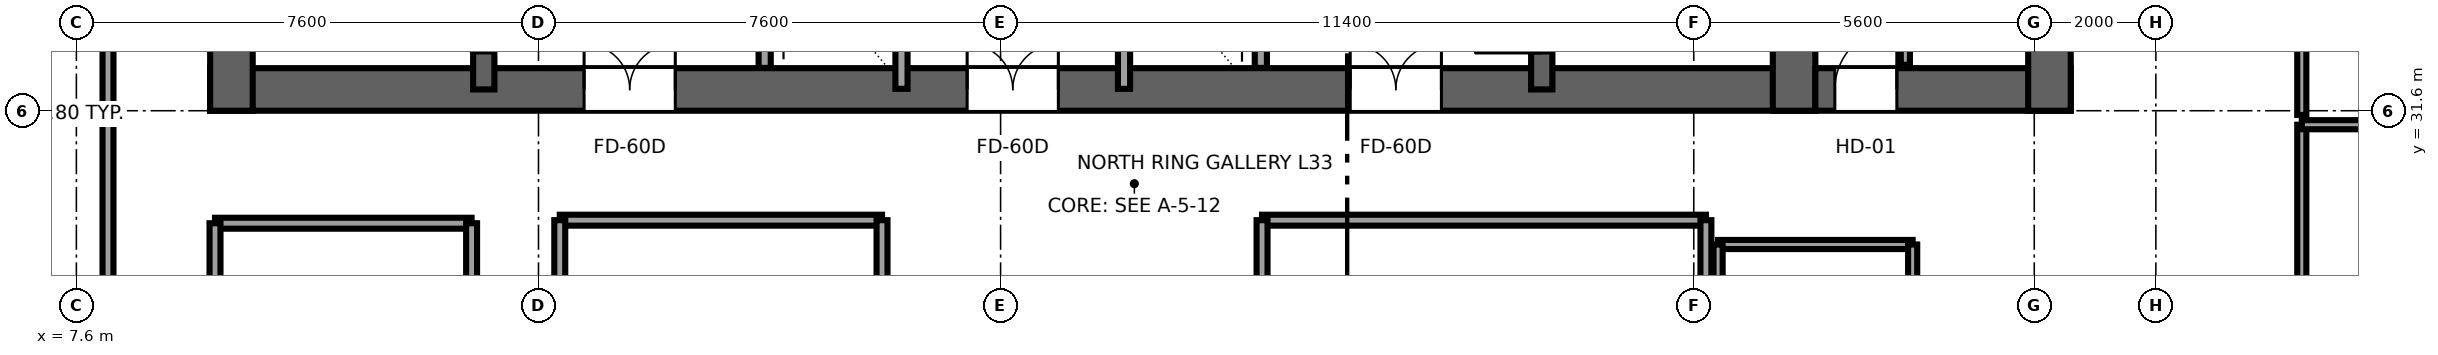
"""IFC4 building model, lengths in metres.
Left out: names, types, materials, properties, quantities, classifications, styles, units other than length and angle.
Written with IfcOpenShell. Run it as: python <this file> out.ifc"""

import sys

from ifc_helpers import new_model, si_unit, direction, frame, frame_2d, origin, place, context, subcontext, project, spatial, rectangle, extrude, source, transform, mapped, element, fill, save


model = new_model("IFC4")
c1 = context("Model", 3, precision=1e-05, world=origin(), true_north=direction((0.0, 1.0)))
c2 = subcontext(c1, "Body", "Model", "MODEL_VIEW")
j1 = project(units=[si_unit("LENGTHUNIT", "METRE"), si_unit("PLANEANGLEUNIT", "RADIAN")], contexts=[c1])
p1 = place(None, origin())
s1 = spatial("IfcSite", under=j1, at=p1, CompositionType="ELEMENT")
p2 = place(p1, origin())
s2 = spatial("IfcBuilding", under=s1, at=p2, CompositionType="ELEMENT")
p3 = place(p2, frame((0.0, 0.0, 129.3)))
s3 = spatial("IfcBuildingStorey", under=s2, at=p3, CompositionType="ELEMENT", Elevation=129.3)
p4 = place(p3, frame((9.8, 31.95, 0.0), z_axis=(0.0, 0.0, 1.0), x_axis=(1.0, 0.0, 0.0)))
e1 = element("IfcWall", 1, at=p4, inside=s3, PredefinedType="SHEAR", context=c2, shape_type="SweptSolid", body=[
    extrude(rectangle(XDim=26.4, YDim=0.7, at=frame_2d((13.2, 0.0))), origin(), (0.0, 0.0, 1.0), 3.55),
])
p5 = place(p4, frame((7.65, 0.0, 0.0), z_axis=(0.0, 0.0, 1.0), x_axis=(-1.0, 0.0, 0.0)))
e2 = element("IfcOpeningElement", 2, at=p5, cuts=e1, PredefinedType="OPENING", context=c2, shape_type="SweptSolid", body=[
    extrude(rectangle(XDim=1.5, YDim=2.04, at=frame_2d((0.75, 1.02))), frame((0.0, 0.36, 0.0), z_axis=(0.0, -1.0, 0.0), x_axis=(1.0, 0.0, 0.0)), (0.0, 0.0, 1.0), 0.72),
])
p6 = place(p4, frame((13.95, 0.0, 0.0), z_axis=(0.0, 0.0, 1.0), x_axis=(-1.0, 0.0, 0.0)))
e3 = element("IfcOpeningElement", 3, at=p6, cuts=e1, PredefinedType="OPENING", context=c2, shape_type="SweptSolid", body=[
    extrude(rectangle(XDim=1.5, YDim=2.04, at=frame_2d((0.75, 1.02))), frame((0.0, 0.36, 0.0), z_axis=(0.0, -1.0, 0.0), x_axis=(1.0, 0.0, 0.0)), (0.0, 0.0, 1.0), 0.72),
])
p7 = place(p4, frame((20.25, 0.0, 0.0), z_axis=(0.0, 0.0, 1.0), x_axis=(-1.0, 0.0, 0.0)))
e4 = element("IfcOpeningElement", 4, at=p7, cuts=e1, PredefinedType="OPENING", context=c2, shape_type="SweptSolid", body=[
    extrude(rectangle(XDim=1.5, YDim=2.04, at=frame_2d((0.75, 1.02))), frame((0.0, 0.36, 0.0), z_axis=(0.0, -1.0, 0.0), x_axis=(1.0, 0.0, 0.0)), (0.0, 0.0, 1.0), 0.72),
])
for number, where, z_axis, x_axis in (
    (5, (10.15, 31.6, 0.0), (0.0, 0.0, 1.0), (0.0, 1.0, 0.0)),
    (6, (35.85, 31.6, 0.0), (0.0, 0.0, 1.0), (0.0, 1.0, 0.0)),
):
    element("IfcWall", number, at=place(p3, frame(where, z_axis=z_axis, x_axis=x_axis)), inside=s3, PredefinedType="SHEAR", context=c2, shape_type="SweptSolid", body=[
        extrude(rectangle(XDim=13.6, YDim=0.7, at=frame_2d((6.8, 0.0))), origin(), (0.0, 0.0, 1.0), 3.55),
    ])
p8 = place(p3, frame((14.3, 31.95, 0.0), z_axis=(0.0, 0.0, 1.0), x_axis=(0.0, 1.0, 0.0)))
e7 = element("IfcWall", 7, at=p8, inside=s3, PredefinedType="SHEAR", context=c2, shape_type="SweptSolid", body=[
    extrude(rectangle(XDim=12.9, YDim=0.35, at=frame_2d((6.45, 0.0))), origin(), (0.0, 0.0, 1.0), 3.55),
])
p9 = place(p8, frame((0.6, 0.0, 0.0)))
e8 = element("IfcOpeningElement", 8, at=p9, cuts=e7, PredefinedType="OPENING", context=c2, shape_type="SweptSolid", body=[
    extrude(rectangle(XDim=1.1, YDim=2.12, at=frame_2d((0.55, 1.06))), frame((0.0, 0.185, 0.0), z_axis=(0.0, -1.0, 0.0), x_axis=(1.0, 0.0, 0.0)), (0.0, 0.0, 1.0), 0.37),
])
p10 = place(p3, frame((31.7, 31.95, 0.0), z_axis=(0.0, 0.0, 1.0), x_axis=(0.0, 1.0, 0.0)))
e9 = element("IfcWall", 9, at=p10, inside=s3, PredefinedType="SHEAR", context=c2, shape_type="SweptSolid", body=[
    extrude(rectangle(XDim=12.9, YDim=0.35, at=frame_2d((6.45, 0.0))), origin(), (0.0, 0.0, 1.0), 3.55),
])
p11 = place(p10, frame((1.7, 0.0, 0.0), z_axis=(0.0, 0.0, 1.0), x_axis=(-1.0, 0.0, 0.0)))
e10 = element("IfcOpeningElement", 10, at=p11, cuts=e9, PredefinedType="OPENING", context=c2, shape_type="SweptSolid", body=[
    extrude(rectangle(XDim=1.1, YDim=2.12, at=frame_2d((0.55, 1.06))), frame((0.0, 0.185, 0.0), z_axis=(0.0, -1.0, 0.0), x_axis=(1.0, 0.0, 0.0)), (0.0, 0.0, 1.0), 0.37),
])
p12 = place(p3, frame((36.2, 31.95, 0.0), z_axis=(0.0, 0.0, 1.0), x_axis=(1.0, 0.0, 0.0)))
e11 = element("IfcWall", 11, at=p12, inside=s3, PredefinedType="SHEAR", context=c2, shape_type="SweptSolid", body=[
    extrude(rectangle(XDim=4.2, YDim=0.7, at=frame_2d((2.1, 0.0))), origin(), (0.0, 0.0, 1.0), 3.55),
])
p13 = place(p12, frame((1.34, 0.0, 0.0), z_axis=(0.0, 0.0, 1.0), x_axis=(-1.0, 0.0, 0.0)))
e12 = element("IfcOpeningElement", 12, at=p13, cuts=e11, PredefinedType="OPENING", context=c2, shape_type="SweptSolid", body=[
    extrude(rectangle(XDim=1.02, YDim=2.03, at=frame_2d((0.51, 1.015))), frame((0.0, 0.36, 0.0), z_axis=(0.0, -1.0, 0.0), x_axis=(1.0, 0.0, 0.0)), (0.0, 0.0, 1.0), 0.72),
])
p14 = place(p3, frame((40.05, 31.6, 0.0), z_axis=(0.0, 0.0, 1.0), x_axis=(0.0, 1.0, 0.0)))
e13 = element("IfcWall", 13, at=p14, inside=s3, PredefinedType="SHEAR", context=c2, shape_type="SweptSolid", body=[
    extrude(rectangle(XDim=13.6, YDim=0.7, at=frame_2d((6.8, 0.0))), origin(), (0.0, 0.0, 1.0), 3.55),
])
for number, where, z_axis, x_axis in (
    (14, (18.92, 32.304, 0.0), (0.0, 0.0, 1.0), (0.0, 1.0, 0.0)),
    (15, (27.08, 32.304, 0.0), (0.0, 0.0, 1.0), (0.0, 1.0, 0.0)),
):
    element("IfcWall", number, at=place(p3, frame(where, z_axis=z_axis, x_axis=x_axis)), inside=s3, PredefinedType="SOLIDWALL", context=c2, shape_type="SweptSolid", body=[
        extrude(rectangle(XDim=3.846, YDim=0.2, at=frame_2d((1.923, 0.0))), origin(), (0.0, 0.0, 1.0), 3.37),
    ])
p15 = place(p3, frame((21.17, 31.96, 0.0), z_axis=(0.0, 0.0, 1.0), x_axis=(0.0, 1.0, 0.0)))
e16 = element("IfcWall", 16, at=p15, inside=s3, PredefinedType="SOLIDWALL", context=c2, shape_type="SweptSolid", body=[
    extrude(rectangle(XDim=12.58, YDim=0.2, at=frame_2d((6.29, 0.0))), origin(), (0.0, 0.0, 1.0), 3.37),
])
p16 = place(p15, frame((5.74, 0.0, 0.0)))
e17 = element("IfcOpeningElement", 17, at=p16, cuts=e16, PredefinedType="OPENING", context=c2, shape_type="SweptSolid", body=[
    extrude(rectangle(XDim=1.1, YDim=2.12, at=frame_2d((0.55, 1.06))), frame((0.0, 0.11, 0.0), z_axis=(0.0, -1.0, 0.0), x_axis=(1.0, 0.0, 0.0)), (0.0, 0.0, 1.0), 0.22),
])
p17 = place(p15, frame((8.24, 0.0, 0.0)))
e18 = element("IfcOpeningElement", 18, at=p17, cuts=e16, PredefinedType="OPENING", context=c2, shape_type="SweptSolid", body=[
    extrude(rectangle(XDim=1.1, YDim=2.12, at=frame_2d((0.55, 1.06))), frame((0.0, 0.11, 0.0), z_axis=(0.0, -1.0, 0.0), x_axis=(1.0, 0.0, 0.0)), (0.0, 0.0, 1.0), 0.22),
])
p18 = place(p3, frame((24.83, 31.96, 0.0), z_axis=(0.0, 0.0, 1.0), x_axis=(0.0, 1.0, 0.0)))
e19 = element("IfcWall", 19, at=p18, inside=s3, PredefinedType="SOLIDWALL", context=c2, shape_type="SweptSolid", body=[
    extrude(rectangle(XDim=12.58, YDim=0.2, at=frame_2d((6.29, 0.0))), origin(), (0.0, 0.0, 1.0), 3.37),
])
p19 = place(p18, frame((5.74, 0.0, 0.0)))
e20 = element("IfcOpeningElement", 20, at=p19, cuts=e19, PredefinedType="OPENING", context=c2, shape_type="SweptSolid", body=[
    extrude(rectangle(XDim=1.1, YDim=2.12, at=frame_2d((0.55, 1.06))), frame((0.0, 0.11, 0.0), z_axis=(0.0, -1.0, 0.0), x_axis=(1.0, 0.0, 0.0)), (0.0, 0.0, 1.0), 0.22),
])
p20 = place(p18, frame((8.24, 0.0, 0.0)))
e21 = element("IfcOpeningElement", 21, at=p20, cuts=e19, PredefinedType="OPENING", context=c2, shape_type="SweptSolid", body=[
    extrude(rectangle(XDim=1.1, YDim=2.12, at=frame_2d((0.55, 1.06))), frame((0.0, 0.11, 0.0), z_axis=(0.0, -1.0, 0.0), x_axis=(1.0, 0.0, 0.0)), (0.0, 0.0, 1.0), 0.22),
])
p21 = place(p3, frame((37.68, 32.355, 0.0), z_axis=(0.0, 0.0, 1.0), x_axis=(0.0, 1.0, 0.0)))
e22 = element("IfcWall", 22, at=p21, inside=s3, PredefinedType="PARTITIONING", context=c2, shape_type="SweptSolid", body=[
    extrude(rectangle(XDim=5.845, YDim=0.15, at=frame_2d((2.922, 0.0))), origin(), (0.0, 0.0, 1.0), 3.37),
])
p22 = place(p21, frame((2.413, 0.0, 0.0)))
e23 = element("IfcOpeningElement", 23, at=p22, cuts=e22, PredefinedType="OPENING", context=c2, shape_type="SweptSolid", body=[
    extrude(rectangle(XDim=1.02, YDim=2.03, at=frame_2d((0.51, 1.015))), frame((0.0, 0.085, 0.0), z_axis=(0.0, -1.0, 0.0), x_axis=(1.0, 0.0, 0.0)), (0.0, 0.0, 1.0), 0.17),
])
p23 = place(p3, frame((8.12, 22.3, 0.0), z_axis=(0.0, 0.0, 1.0), x_axis=(0.0, 1.0, 0.0)))
e24 = element("IfcWall", 24, at=p23, inside=s3, PredefinedType="PARTITIONING", context=c2, shape_type="SweptSolid", body=[
    extrude(rectangle(XDim=13.5, YDim=0.18, at=frame_2d((6.75, 0.0))), origin(), (0.0, 0.0, 1.0), 3.37),
])
p24 = place(p23, frame((3.35, 0.0, 0.0)))
e25 = element("IfcOpeningElement", 25, at=p24, cuts=e24, PredefinedType="OPENING", context=c2, shape_type="SweptSolid", body=[
    extrude(rectangle(XDim=1.65, YDim=2.15, at=frame_2d((0.825, 1.075))), frame((0.0, 0.1, 0.0), z_axis=(0.0, -1.0, 0.0), x_axis=(1.0, 0.0, 0.0)), (0.0, 0.0, 1.0), 0.2),
])
p25 = place(p3, frame((44.2, 22.38, 0.0), z_axis=(0.0, 0.0, 1.0), x_axis=(0.0, 1.0, 0.0)))
e26 = element("IfcWall", 26, at=p25, inside=s3, PredefinedType="PARTITIONING", context=c2, shape_type="SweptSolid", body=[
    extrude(rectangle(XDim=8.99, YDim=0.15, at=frame_2d((4.495, 0.0))), origin(), (0.0, 0.0, 1.0), 3.37),
])
p26 = place(p25, frame((4.005, 0.0, 0.0)))
e27 = element("IfcOpeningElement", 27, at=p26, cuts=e26, PredefinedType="OPENING", context=c2, shape_type="SweptSolid", body=[
    extrude(rectangle(XDim=0.98, YDim=2.12, at=frame_2d((0.49, 1.06))), frame((0.0, 0.085, 0.0), z_axis=(0.0, -1.0, 0.0), x_axis=(1.0, 0.0, 0.0)), (0.0, 0.0, 1.0), 0.17),
])
p27 = place(p3, frame((44.2, 31.37, 0.0), z_axis=(0.0, 0.0, 1.0), x_axis=(1.0, 0.0, 0.0)))
e28 = element("IfcWall", 28, at=p27, inside=s3, PredefinedType="PARTITIONING", context=c2, shape_type="SweptSolid", body=[
    extrude(rectangle(XDim=10.03, YDim=0.15, at=frame_2d((5.015, 0.0))), origin(), (0.0, 0.0, 1.0), 3.37),
])
p28 = place(p3, frame((44.2, 31.53, 0.0), z_axis=(0.0, 0.0, 1.0), x_axis=(0.0, 1.0, 0.0)))
e29 = element("IfcWall", 29, at=p28, inside=s3, PredefinedType="PARTITIONING", context=c2, shape_type="SweptSolid", body=[
    extrude(rectangle(XDim=8.99, YDim=0.15, at=frame_2d((4.495, 0.0))), origin(), (0.0, 0.0, 1.0), 3.37),
])
p29 = place(p28, frame((4.005, 0.0, 0.0)))
e30 = element("IfcOpeningElement", 30, at=p29, cuts=e29, PredefinedType="OPENING", context=c2, shape_type="SweptSolid", body=[
    extrude(rectangle(XDim=0.98, YDim=2.12, at=frame_2d((0.49, 1.06))), frame((0.0, 0.085, 0.0), z_axis=(0.0, -1.0, 0.0), x_axis=(1.0, 0.0, 0.0)), (0.0, 0.0, 1.0), 0.17),
])
p30 = place(p3, frame((9.88, 29.75, 0.0), z_axis=(0.0, 0.0, 1.0), x_axis=(1.0, 0.0, 0.0)))
e31 = element("IfcWall", 31, at=p30, inside=s3, PredefinedType="PARTITIONING", context=c2, shape_type="SweptSolid", body=[
    extrude(rectangle(XDim=4.22, YDim=0.18, at=frame_2d((2.11, 0.0))), origin(), (0.0, 0.0, 1.0), 3.37),
])
for number, where, z_axis, x_axis in (
    (32, (9.88, 22.3, 0.0), (0.0, 0.0, 1.0), (0.0, 1.0, 0.0)),
    (33, (14.1, 22.3, 0.0), (0.0, 0.0, 1.0), (0.0, 1.0, 0.0)),
):
    element("IfcWall", number, at=place(p3, frame(where, z_axis=z_axis, x_axis=x_axis)), inside=s3, PredefinedType="PARTITIONING", context=c2, shape_type="SweptSolid", body=[
        extrude(rectangle(XDim=7.45, YDim=0.18, at=frame_2d((3.725, 0.0))), origin(), (0.0, 0.0, 1.0), 3.37),
    ])
p31 = place(p3, frame((27.1, 29.8, 0.0), z_axis=(0.0, 0.0, 1.0), x_axis=(1.0, 0.0, 0.0)))
e34 = element("IfcWall", 34, at=p31, inside=s3, PredefinedType="PARTITIONING", context=c2, shape_type="SweptSolid", body=[
    extrude(rectangle(XDim=7.3, YDim=0.18, at=frame_2d((3.65, 0.0))), origin(), (0.0, 0.0, 1.0), 3.37),
])
for number, where, z_axis, x_axis in (
    (35, (27.1, 22.3, 0.0), (0.0, 0.0, 1.0), (0.0, 1.0, 0.0)),
    (36, (34.4, 22.3, 0.0), (0.0, 0.0, 1.0), (0.0, 1.0, 0.0)),
):
    element("IfcWall", number, at=place(p3, frame(where, z_axis=z_axis, x_axis=x_axis)), inside=s3, PredefinedType="PARTITIONING", context=c2, shape_type="SweptSolid", body=[
        extrude(rectangle(XDim=7.5, YDim=0.18, at=frame_2d((3.75, 0.0))), origin(), (0.0, 0.0, 1.0), 3.37),
    ])
p32 = place(p3, frame((15.55, 29.8, 0.0), z_axis=(0.0, 0.0, 1.0), x_axis=(1.0, 0.0, 0.0)))
e37 = element("IfcWall", 37, at=p32, inside=s3, PredefinedType="PARTITIONING", context=c2, shape_type="SweptSolid", body=[
    extrude(rectangle(XDim=5.3, YDim=0.18, at=frame_2d((2.65, 0.0))), origin(), (0.0, 0.0, 1.0), 3.37),
])
for number, where, z_axis, x_axis in (
    (38, (15.55, 22.3, 0.0), (0.0, 0.0, 1.0), (0.0, 1.0, 0.0)),
    (39, (20.85, 22.3, 0.0), (0.0, 0.0, 1.0), (0.0, 1.0, 0.0)),
):
    element("IfcWall", number, at=place(p3, frame(where, z_axis=z_axis, x_axis=x_axis)), inside=s3, PredefinedType="PARTITIONING", context=c2, shape_type="SweptSolid", body=[
        extrude(rectangle(XDim=7.5, YDim=0.18, at=frame_2d((3.75, 0.0))), origin(), (0.0, 0.0, 1.0), 3.37),
    ])
p33 = place(p3, frame((34.6, 29.4, 0.0), z_axis=(0.0, 0.0, 1.0), x_axis=(1.0, 0.0, 0.0)))
e40 = element("IfcWall", 40, at=p33, inside=s3, PredefinedType="PARTITIONING", context=c2, shape_type="SweptSolid", body=[
    extrude(rectangle(XDim=3.2, YDim=0.15, at=frame_2d((1.6, 0.0))), origin(), (0.0, 0.0, 1.0), 3.37),
])
for number, where, z_axis, x_axis in (
    (41, (34.6, 22.3, 0.0), (0.0, 0.0, 1.0), (0.0, 1.0, 0.0)),
    (42, (37.8, 22.3, 0.0), (0.0, 0.0, 1.0), (0.0, 1.0, 0.0)),
):
    element("IfcWall", number, at=place(p3, frame(where, z_axis=z_axis, x_axis=x_axis)), inside=s3, PredefinedType="PARTITIONING", context=c2, shape_type="SweptSolid", body=[
        extrude(rectangle(XDim=7.1, YDim=0.15, at=frame_2d((3.55, 0.0))), origin(), (0.0, 0.0, 1.0), 3.37),
    ])
m1 = source(origin(), c2, "Body", "SweptSolid", [
    extrude(rectangle(XDim=1.1, YDim=2.12, at=frame_2d((0.55, 1.06))), frame((0.0, 0.025, 0.0), z_axis=(0.0, -1.0, 0.0), x_axis=(1.0, 0.0, 0.0)), (0.0, 0.0, 1.0), 0.05),
])
p34 = place(p9, origin())
e43 = element("IfcDoor", 43, at=p34, inside=s3, OperationType="SINGLE_SWING_RIGHT", PredefinedType="DOOR", context=c2, shape_type="MappedRepresentation", body=[
    mapped(m1, transform((0.0, 0.0, 0.0), x_axis=(1.0, 0.0, 0.0), y_axis=(0.0, 1.0, 0.0), z_axis=(0.0, 0.0, 1.0), scale=1.0)),
])
fill(e8, e43)
p35 = place(p11, origin())
e44 = element("IfcDoor", 44, at=p35, inside=s3, OperationType="SINGLE_SWING_LEFT", PredefinedType="DOOR", context=c2, shape_type="MappedRepresentation", body=[
    mapped(m1, transform((0.0, 0.0, 0.0), x_axis=(1.0, 0.0, 0.0), y_axis=(0.0, 1.0, 0.0), z_axis=(0.0, 0.0, 1.0), scale=1.0)),
])
fill(e10, e44)
m2 = source(origin(), c2, "Body", "SweptSolid", [
    extrude(rectangle(XDim=1.5, YDim=2.04, at=frame_2d((0.75, 1.02))), frame((0.0, 0.025, 0.0), z_axis=(0.0, -1.0, 0.0), x_axis=(1.0, 0.0, 0.0)), (0.0, 0.0, 1.0), 0.05),
])
p36 = place(p5, origin())
e45 = element("IfcDoor", 45, at=p36, inside=s3, OperationType="DOUBLE_DOOR_SINGLE_SWING", PredefinedType="DOOR", context=c2, shape_type="MappedRepresentation", body=[
    mapped(m2, transform((0.0, 0.0, 0.0), x_axis=(1.0, 0.0, 0.0), y_axis=(0.0, 1.0, 0.0), z_axis=(0.0, 0.0, 1.0), scale=1.0)),
])
fill(e2, e45)
p37 = place(p6, origin())
e46 = element("IfcDoor", 46, at=p37, inside=s3, OperationType="DOUBLE_DOOR_SINGLE_SWING", PredefinedType="DOOR", context=c2, shape_type="MappedRepresentation", body=[
    mapped(m2, transform((0.0, 0.0, 0.0), x_axis=(1.0, 0.0, 0.0), y_axis=(0.0, 1.0, 0.0), z_axis=(0.0, 0.0, 1.0), scale=1.0)),
])
fill(e3, e46)
p38 = place(p7, origin())
e47 = element("IfcDoor", 47, at=p38, inside=s3, OperationType="DOUBLE_DOOR_SINGLE_SWING", PredefinedType="DOOR", context=c2, shape_type="MappedRepresentation", body=[
    mapped(m2, transform((0.0, 0.0, 0.0), x_axis=(1.0, 0.0, 0.0), y_axis=(0.0, 1.0, 0.0), z_axis=(0.0, 0.0, 1.0), scale=1.0)),
])
fill(e4, e47)
m3 = source(origin(), c2, "Body", "SweptSolid", [
    extrude(rectangle(XDim=1.02, YDim=2.03, at=frame_2d((0.51, 1.015))), frame((0.0, 0.025, 0.0), z_axis=(0.0, -1.0, 0.0), x_axis=(1.0, 0.0, 0.0)), (0.0, 0.0, 1.0), 0.05),
])
p39 = place(p13, origin())
e48 = element("IfcDoor", 48, at=p39, inside=s3, OperationType="SINGLE_SWING_RIGHT", PredefinedType="DOOR", context=c2, shape_type="MappedRepresentation", body=[
    mapped(m3, transform((0.0, 0.0, 0.0), x_axis=(1.0, 0.0, 0.0), y_axis=(0.0, 1.0, 0.0), z_axis=(0.0, 0.0, 1.0), scale=1.0)),
])
fill(e12, e48)
save(model, sys.argv[1])
